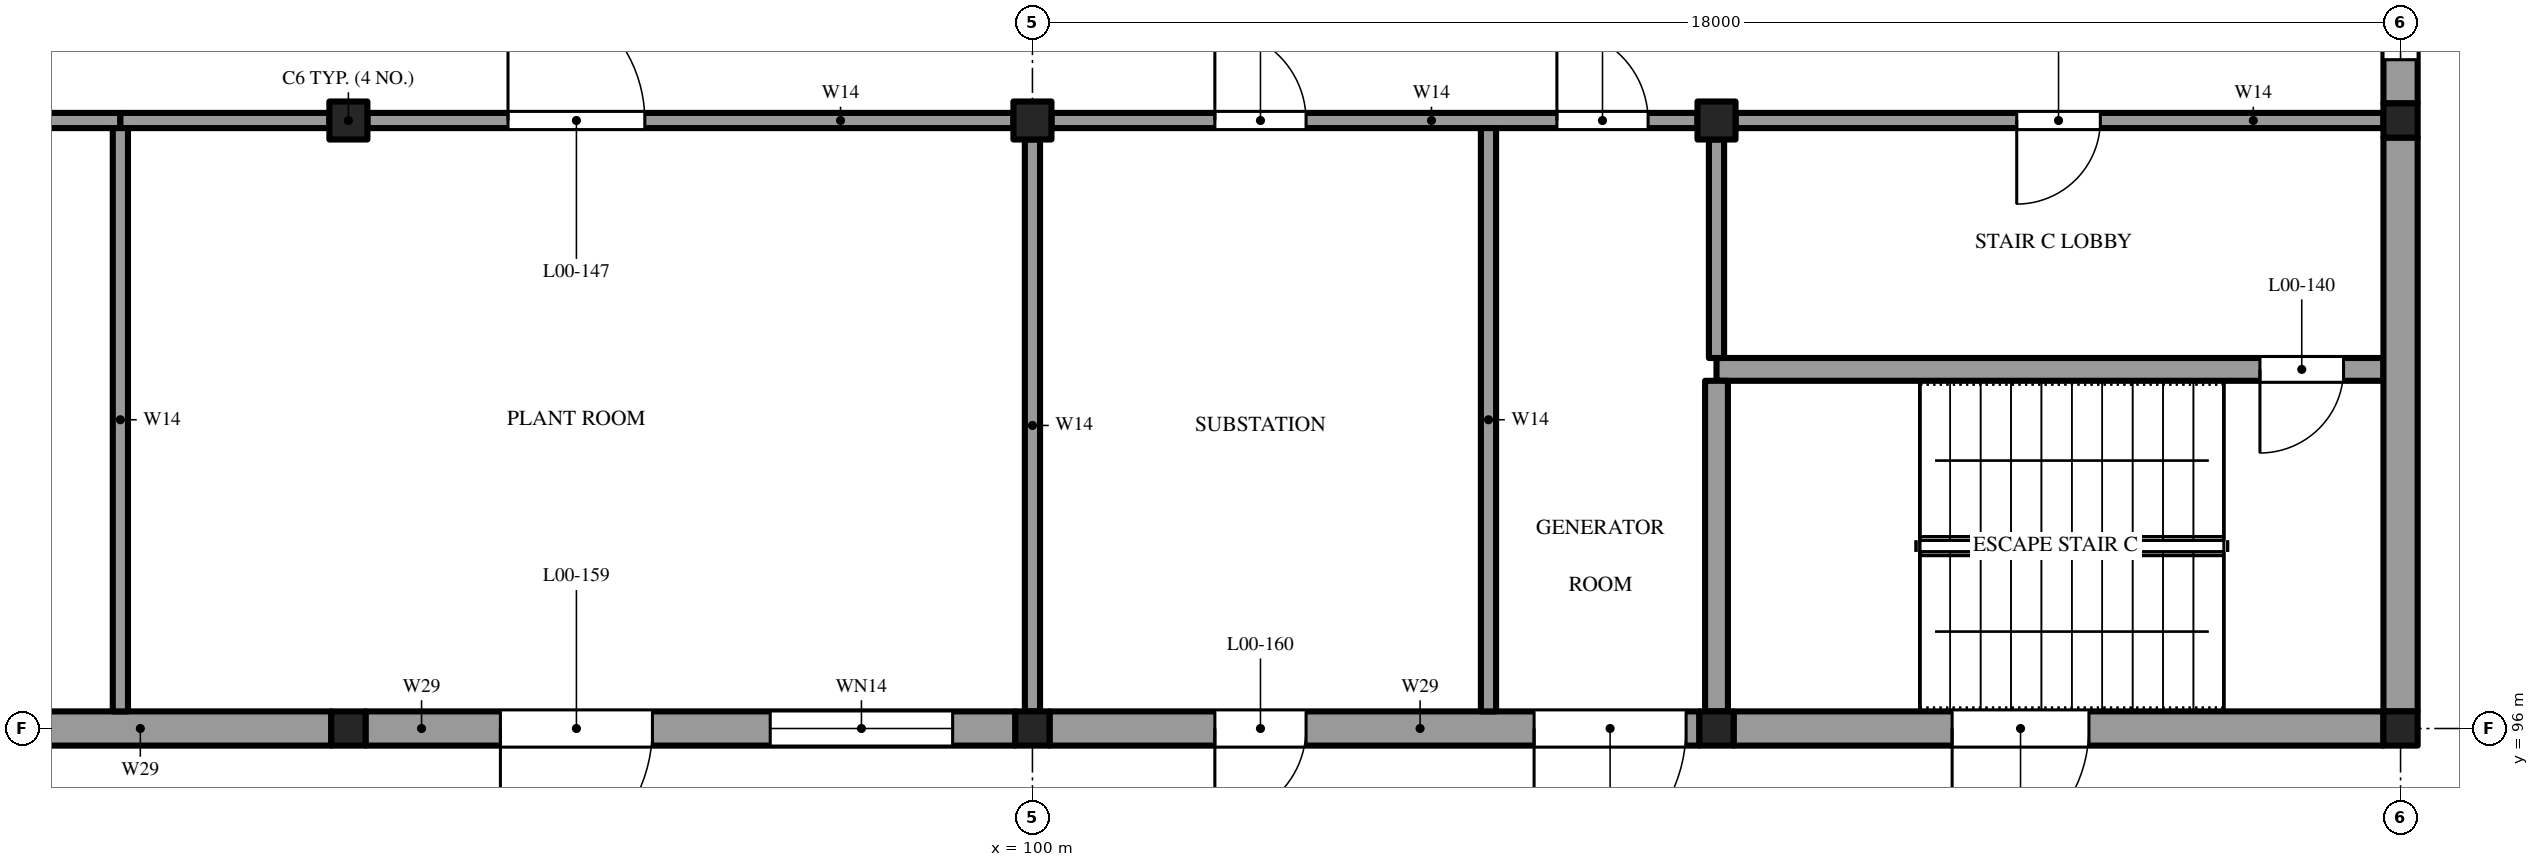
"""IFC4 building model, lengths in metres.
Left out: names, types, materials, properties, quantities, classifications, styles, units other than length and angle.
Written with IfcOpenShell. Run it as: python <this file> out.ifc"""

import sys

from ifc_helpers import new_model, si_unit, direction, frame, frame_2d, origin, origin_2d, place, context, subcontext, project, spatial, rectangle, extrude, element, fill, save


model = new_model("IFC4")
c1 = context("Model", 3, precision=1e-05, world=origin(), true_north=direction((0.0, 1.0)))
c2 = subcontext(c1, "Body", "Model", "MODEL_VIEW")
j1 = project(units=[si_unit("LENGTHUNIT", "METRE"), si_unit("PLANEANGLEUNIT", "RADIAN")], contexts=[c1])
p1 = place(None, origin())
s1 = spatial("IfcSite", under=j1, at=p1, CompositionType="ELEMENT")
p2 = place(p1, origin())
s2 = spatial("IfcBuilding", under=s1, at=p2, CompositionType="ELEMENT")
p3 = place(p2, origin())
s3 = spatial("IfcBuildingStorey", under=s2, at=p3, CompositionType="ELEMENT", Elevation=0.0)
p4 = place(p3, frame((91.0, 96.0, -0.4), z_axis=(0.0, 0.0, 1.0), x_axis=(1.0, 0.0, 0.0)))
e1 = element("IfcColumn", 1, at=p4, inside=s3, PredefinedType="COLUMN", context=c2, shape_type="SweptSolid", body=[
    extrude(rectangle(XDim=0.45, YDim=0.45, at=origin_2d()), origin(), (0.0, 0.0, 1.0), 7.6),
])
p5 = place(p3, frame((91.0, 104.0, -0.4), z_axis=(0.0, 0.0, 1.0), x_axis=(1.0, 0.0, 0.0)))
e2 = element("IfcColumn", 2, at=p5, inside=s3, PredefinedType="COLUMN", context=c2, shape_type="SweptSolid", body=[
    extrude(rectangle(XDim=0.5, YDim=0.5, at=origin_2d()), origin(), (0.0, 0.0, 1.0), 7.6),
])
p6 = place(p3, frame((100.0, 96.0, -0.4), z_axis=(0.0, 0.0, 1.0), x_axis=(1.0, 0.0, 0.0)))
e3 = element("IfcColumn", 3, at=p6, inside=s3, PredefinedType="COLUMN", context=c2, shape_type="SweptSolid", body=[
    extrude(rectangle(XDim=0.45, YDim=0.45, at=origin_2d()), origin(), (0.0, 0.0, 1.0), 7.6),
])
p7 = place(p3, frame((100.0, 104.0, -0.4), z_axis=(0.0, 0.0, 1.0), x_axis=(1.0, 0.0, 0.0)))
e4 = element("IfcColumn", 4, at=p7, inside=s3, PredefinedType="COLUMN", context=c2, shape_type="SweptSolid", body=[
    extrude(rectangle(XDim=0.5, YDim=0.5, at=origin_2d()), origin(), (0.0, 0.0, 1.0), 7.6),
])
p8 = place(p3, frame((109.0, 96.0, -0.4), z_axis=(0.0, 0.0, 1.0), x_axis=(1.0, 0.0, 0.0)))
e5 = element("IfcColumn", 5, at=p8, inside=s3, PredefinedType="COLUMN", context=c2, shape_type="SweptSolid", body=[
    extrude(rectangle(XDim=0.45, YDim=0.45, at=origin_2d()), origin(), (0.0, 0.0, 1.0), 7.6),
])
p9 = place(p3, frame((109.0, 104.0, -0.4), z_axis=(0.0, 0.0, 1.0), x_axis=(1.0, 0.0, 0.0)))
e6 = element("IfcColumn", 6, at=p9, inside=s3, PredefinedType="COLUMN", context=c2, shape_type="SweptSolid", body=[
    extrude(rectangle(XDim=0.5, YDim=0.5, at=origin_2d()), origin(), (0.0, 0.0, 1.0), 7.6),
])
for number, where, z_axis, x_axis in (
    (7, (118.0, 96.0, -0.4), (0.0, 0.0, 1.0), (1.0, 0.0, 0.0)),
    (8, (118.0, 104.0, -0.4), (0.0, 0.0, 1.0), (1.0, 0.0, 0.0)),
):
    element("IfcColumn", number, at=place(p3, frame(where, z_axis=z_axis, x_axis=x_axis)), inside=s3, PredefinedType="COLUMN", context=c2, shape_type="SweptSolid", body=[
        extrude(rectangle(XDim=0.45, YDim=0.45, at=origin_2d()), origin(), (0.0, 0.0, 1.0), 7.6),
    ])
p10 = place(p3, frame((82.225, 96.0, 0.0), z_axis=(0.0, 0.0, 1.0), x_axis=(1.0, 0.0, 0.0)))
e9 = element("IfcWall", 9, at=p10, inside=s3, PredefinedType="SOLIDWALL", context=c2, shape_type="SweptSolid", body=[
    extrude(rectangle(XDim=8.55, YDim=0.45, at=frame_2d((4.275, 0.0))), origin(), (0.0, 0.0, 1.0), 6.9),
])
p11 = place(p10, frame((0.825, 0.0, 4.4)))
e10 = element("IfcOpeningElement", 10, at=p11, cuts=e9, PredefinedType="OPENING", context=c2, shape_type="SweptSolid", body=[
    extrude(rectangle(XDim=2.4, YDim=1.6, at=frame_2d((1.2, 0.8))), frame((0.0, 0.235, 0.0), z_axis=(0.0, -1.0, 0.0), x_axis=(1.0, 0.0, 0.0)), (0.0, 0.0, 1.0), 0.47),
])
p12 = place(p3, frame((91.225, 96.0, 0.0), z_axis=(0.0, 0.0, 1.0), x_axis=(1.0, 0.0, 0.0)))
e11 = element("IfcWall", 11, at=p12, inside=s3, PredefinedType="SOLIDWALL", context=c2, shape_type="SweptSolid", body=[
    extrude(rectangle(XDim=8.55, YDim=0.45, at=frame_2d((4.275, 0.0))), origin(), (0.0, 0.0, 1.0), 6.9),
])
p13 = place(p12, frame((1.775, 0.0, 0.0)))
e12 = element("IfcOpeningElement", 12, at=p13, cuts=e11, PredefinedType="OPENING", context=c2, shape_type="SweptSolid", body=[
    extrude(rectangle(XDim=2.0, YDim=2.4, at=frame_2d((1.0, 1.2))), frame((0.0, 0.235, 0.0), z_axis=(0.0, -1.0, 0.0), x_axis=(1.0, 0.0, 0.0)), (0.0, 0.0, 1.0), 0.47),
])
p14 = place(p12, frame((5.325, 0.0, 4.4)))
e13 = element("IfcOpeningElement", 13, at=p14, cuts=e11, PredefinedType="OPENING", context=c2, shape_type="SweptSolid", body=[
    extrude(rectangle(XDim=2.4, YDim=1.6, at=frame_2d((1.2, 0.8))), frame((0.0, 0.235, 0.0), z_axis=(0.0, -1.0, 0.0), x_axis=(1.0, 0.0, 0.0)), (0.0, 0.0, 1.0), 0.47),
])
p15 = place(p3, frame((100.225, 96.0, 0.0), z_axis=(0.0, 0.0, 1.0), x_axis=(1.0, 0.0, 0.0)))
e14 = element("IfcWall", 14, at=p15, inside=s3, PredefinedType="SOLIDWALL", context=c2, shape_type="SweptSolid", body=[
    extrude(rectangle(XDim=8.55, YDim=0.45, at=frame_2d((4.275, 0.0))), origin(), (0.0, 0.0, 1.0), 6.9),
])
p16 = place(p15, frame((2.175, 0.0, 0.0)))
e15 = element("IfcOpeningElement", 15, at=p16, cuts=e14, PredefinedType="OPENING", context=c2, shape_type="SweptSolid", body=[
    extrude(rectangle(XDim=1.2, YDim=2.1, at=frame_2d((0.6, 1.05))), frame((0.0, 0.235, 0.0), z_axis=(0.0, -1.0, 0.0), x_axis=(1.0, 0.0, 0.0)), (0.0, 0.0, 1.0), 0.47),
])
p17 = place(p15, frame((6.375, 0.0, 0.0)))
e16 = element("IfcOpeningElement", 16, at=p17, cuts=e14, PredefinedType="OPENING", context=c2, shape_type="SweptSolid", body=[
    extrude(rectangle(XDim=2.0, YDim=2.4, at=frame_2d((1.0, 1.2))), frame((0.0, 0.235, 0.0), z_axis=(0.0, -1.0, 0.0), x_axis=(1.0, 0.0, 0.0)), (0.0, 0.0, 1.0), 0.47),
])
p18 = place(p3, frame((109.225, 96.0, 0.0), z_axis=(0.0, 0.0, 1.0), x_axis=(1.0, 0.0, 0.0)))
e17 = element("IfcWall", 17, at=p18, inside=s3, PredefinedType="SOLIDWALL", context=c2, shape_type="SweptSolid", body=[
    extrude(rectangle(XDim=8.55, YDim=0.45, at=frame_2d((4.275, 0.0))), origin(), (0.0, 0.0, 1.0), 6.9),
])
p19 = place(p18, frame((2.875, 0.0, 0.0)))
e18 = element("IfcOpeningElement", 18, at=p19, cuts=e17, PredefinedType="OPENING", context=c2, shape_type="SweptSolid", body=[
    extrude(rectangle(XDim=1.8, YDim=2.1, at=frame_2d((0.9, 1.05))), frame((0.0, 0.235, 0.0), z_axis=(0.0, -1.0, 0.0), x_axis=(1.0, 0.0, 0.0)), (0.0, 0.0, 1.0), 0.47),
])
p20 = place(p3, frame((109.0, 100.725, 0.0), z_axis=(0.0, 0.0, 1.0), x_axis=(1.0, 0.0, 0.0)))
e19 = element("IfcWall", 19, at=p20, inside=s3, PredefinedType="SHEAR", context=c2, shape_type="SweptSolid", body=[
    extrude(rectangle(XDim=8.775, YDim=0.3, at=frame_2d((4.387, 0.0))), origin(), (0.0, 0.0, 1.0), 6.9),
])
p21 = place(p20, frame((7.15, 0.0, 0.0)))
e20 = element("IfcOpeningElement", 20, at=p21, cuts=e19, PredefinedType="OPENING", context=c2, shape_type="SweptSolid", body=[
    extrude(rectangle(XDim=1.1, YDim=2.1, at=frame_2d((0.55, 1.05))), frame((0.0, 0.16, 0.0), z_axis=(0.0, -1.0, 0.0), x_axis=(1.0, 0.0, 0.0)), (0.0, 0.0, 1.0), 0.32),
])
p22 = place(p3, frame((82.25, 104.0, 0.0), z_axis=(0.0, 0.0, 1.0), x_axis=(1.0, 0.0, 0.0)))
e21 = element("IfcWall", 21, at=p22, inside=s3, PredefinedType="SOLIDWALL", context=c2, shape_type="SweptSolid", body=[
    extrude(rectangle(XDim=5.75, YDim=0.2, at=frame_2d((2.875, 0.0))), origin(), (0.0, 0.0, 1.0), 6.9),
])
p23 = place(p3, frame((88.0, 104.0, 0.0), z_axis=(0.0, 0.0, 1.0), x_axis=(1.0, 0.0, 0.0)))
e22 = element("IfcWall", 22, at=p23, inside=s3, PredefinedType="SOLIDWALL", context=c2, shape_type="SweptSolid", body=[
    extrude(rectangle(XDim=2.75, YDim=0.2, at=frame_2d((1.375, 0.0))), origin(), (0.0, 0.0, 1.0), 6.9),
])
p24 = place(p3, frame((91.25, 104.0, 0.0), z_axis=(0.0, 0.0, 1.0), x_axis=(1.0, 0.0, 0.0)))
e23 = element("IfcWall", 23, at=p24, inside=s3, PredefinedType="SOLIDWALL", context=c2, shape_type="SweptSolid", body=[
    extrude(rectangle(XDim=8.5, YDim=0.2, at=frame_2d((4.25, 0.0))), origin(), (0.0, 0.0, 1.0), 6.9),
])
p25 = place(p24, frame((1.85, 0.0, 0.0)))
e24 = element("IfcOpeningElement", 24, at=p25, cuts=e23, PredefinedType="OPENING", context=c2, shape_type="SweptSolid", body=[
    extrude(rectangle(XDim=1.8, YDim=2.1, at=frame_2d((0.9, 1.05))), frame((0.0, 0.11, 0.0), z_axis=(0.0, -1.0, 0.0), x_axis=(1.0, 0.0, 0.0)), (0.0, 0.0, 1.0), 0.22),
])
p26 = place(p3, frame((100.25, 104.0, 0.0), z_axis=(0.0, 0.0, 1.0), x_axis=(1.0, 0.0, 0.0)))
e25 = element("IfcWall", 25, at=p26, inside=s3, PredefinedType="SOLIDWALL", context=c2, shape_type="SweptSolid", body=[
    extrude(rectangle(XDim=8.5, YDim=0.2, at=frame_2d((4.25, 0.0))), origin(), (0.0, 0.0, 1.0), 6.9),
])
p27 = place(p26, frame((2.15, 0.0, 0.0)))
e26 = element("IfcOpeningElement", 26, at=p27, cuts=e25, PredefinedType="OPENING", context=c2, shape_type="SweptSolid", body=[
    extrude(rectangle(XDim=1.2, YDim=2.1, at=frame_2d((0.6, 1.05))), frame((0.0, 0.11, 0.0), z_axis=(0.0, -1.0, 0.0), x_axis=(1.0, 0.0, 0.0)), (0.0, 0.0, 1.0), 0.22),
])
p28 = place(p26, frame((6.65, 0.0, 0.0)))
e27 = element("IfcOpeningElement", 27, at=p28, cuts=e25, PredefinedType="OPENING", context=c2, shape_type="SweptSolid", body=[
    extrude(rectangle(XDim=1.2, YDim=2.1, at=frame_2d((0.6, 1.05))), frame((0.0, 0.11, 0.0), z_axis=(0.0, -1.0, 0.0), x_axis=(1.0, 0.0, 0.0)), (0.0, 0.0, 1.0), 0.22),
])
p29 = place(p3, frame((109.25, 104.0, 0.0), z_axis=(0.0, 0.0, 1.0), x_axis=(1.0, 0.0, 0.0)))
e28 = element("IfcWall", 28, at=p29, inside=s3, PredefinedType="SOLIDWALL", context=c2, shape_type="SweptSolid", body=[
    extrude(rectangle(XDim=8.525, YDim=0.2, at=frame_2d((4.262, 0.0))), origin(), (0.0, 0.0, 1.0), 6.9),
])
p30 = place(p29, frame((3.7, 0.0, 0.0)))
e29 = element("IfcOpeningElement", 29, at=p30, cuts=e28, PredefinedType="OPENING", context=c2, shape_type="SweptSolid", body=[
    extrude(rectangle(XDim=1.1, YDim=2.1, at=frame_2d((0.55, 1.05))), frame((0.0, 0.11, 0.0), z_axis=(0.0, -1.0, 0.0), x_axis=(1.0, 0.0, 0.0)), (0.0, 0.0, 1.0), 0.22),
])
p31 = place(p3, frame((88.0, 96.225, 0.0), z_axis=(0.0, 0.0, 1.0), x_axis=(0.0, 1.0, 0.0)))
e30 = element("IfcWall", 30, at=p31, inside=s3, PredefinedType="SOLIDWALL", context=c2, shape_type="SweptSolid", body=[
    extrude(rectangle(XDim=7.675, YDim=0.2, at=frame_2d((3.837, 0.0))), origin(), (0.0, 0.0, 1.0), 6.9),
])
p32 = place(p3, frame((100.0, 96.225, 0.0), z_axis=(0.0, 0.0, 1.0), x_axis=(0.0, 1.0, 0.0)))
e31 = element("IfcWall", 31, at=p32, inside=s3, PredefinedType="SOLIDWALL", context=c2, shape_type="SweptSolid", body=[
    extrude(rectangle(XDim=7.525, YDim=0.2, at=frame_2d((3.762, 0.0))), origin(), (0.0, 0.0, 1.0), 6.9),
])
p33 = place(p3, frame((106.0, 96.225, 0.0), z_axis=(0.0, 0.0, 1.0), x_axis=(0.0, 1.0, 0.0)))
e32 = element("IfcWall", 32, at=p33, inside=s3, PredefinedType="SOLIDWALL", context=c2, shape_type="SweptSolid", body=[
    extrude(rectangle(XDim=7.675, YDim=0.2, at=frame_2d((3.837, 0.0))), origin(), (0.0, 0.0, 1.0), 6.9),
])
p34 = place(p3, frame((109.0, 96.225, 0.0), z_axis=(0.0, 0.0, 1.0), x_axis=(0.0, 1.0, 0.0)))
e33 = element("IfcWall", 33, at=p34, inside=s3, PredefinedType="SHEAR", context=c2, shape_type="SweptSolid", body=[
    extrude(rectangle(XDim=4.35, YDim=0.3, at=frame_2d((2.175, 0.0))), origin(), (0.0, 0.0, 1.0), 6.9),
])
p35 = place(p3, frame((109.0, 100.875, 0.0), z_axis=(0.0, 0.0, 1.0), x_axis=(0.0, 1.0, 0.0)))
e34 = element("IfcWall", 34, at=p35, inside=s3, PredefinedType="SOLIDWALL", context=c2, shape_type="SweptSolid", body=[
    extrude(rectangle(XDim=2.875, YDim=0.2, at=frame_2d((1.438, 0.0))), origin(), (0.0, 0.0, 1.0), 6.9),
])
p36 = place(p3, frame((118.0, 96.225, 0.0), z_axis=(0.0, 0.0, 1.0), x_axis=(0.0, 1.0, 0.0)))
e35 = element("IfcWall", 35, at=p36, inside=s3, PredefinedType="SOLIDWALL", context=c2, shape_type="SweptSolid", body=[
    extrude(rectangle(XDim=7.55, YDim=0.45, at=frame_2d((3.775, 0.0))), origin(), (0.0, 0.0, 1.0), 6.9),
])
p37 = place(p3, frame((118.0, 104.225, 0.0), z_axis=(0.0, 0.0, 1.0), x_axis=(0.0, 1.0, 0.0)))
e36 = element("IfcWall", 36, at=p37, inside=s3, PredefinedType="SOLIDWALL", context=c2, shape_type="SweptSolid", body=[
    extrude(rectangle(XDim=7.55, YDim=0.45, at=frame_2d((3.775, 0.0))), origin(), (0.0, 0.0, 1.0), 6.9),
])
p38 = place(p37, frame((0.575, 0.0, 4.4)))
e37 = element("IfcOpeningElement", 37, at=p38, cuts=e36, PredefinedType="OPENING", context=c2, shape_type="SweptSolid", body=[
    extrude(rectangle(XDim=2.4, YDim=1.6, at=frame_2d((1.2, 0.8))), frame((0.0, 0.235, 0.0), z_axis=(0.0, -1.0, 0.0), x_axis=(1.0, 0.0, 0.0)), (0.0, 0.0, 1.0), 0.47),
])
p39 = place(p37, frame((4.575, 0.0, 4.4)))
e38 = element("IfcOpeningElement", 38, at=p39, cuts=e36, PredefinedType="OPENING", context=c2, shape_type="SweptSolid", body=[
    extrude(rectangle(XDim=2.4, YDim=1.6, at=frame_2d((1.2, 0.8))), frame((0.0, 0.235, 0.0), z_axis=(0.0, -1.0, 0.0), x_axis=(1.0, 0.0, 0.0)), (0.0, 0.0, 1.0), 0.47),
])
p40 = place(p30, frame((1.1, 0.0, 0.0), z_axis=(0.0, 0.0, 1.0), x_axis=(-1.0, 0.0, 0.0)))
e39 = element("IfcDoor", 39, at=p40, inside=s3, OperationType="SINGLE_SWING_RIGHT", PredefinedType="DOOR", context=c2, shape_type="SweptSolid", body=[
    extrude(rectangle(XDim=1.1, YDim=2.1, at=frame_2d((0.55, 1.05))), frame((0.0, 0.025, 0.0), z_axis=(0.0, -1.0, 0.0), x_axis=(1.0, 0.0, 0.0)), (0.0, 0.0, 1.0), 0.05),
])
fill(e29, e39)
p41 = place(p21, frame((1.1, 0.0, 0.0), z_axis=(0.0, 0.0, 1.0), x_axis=(-1.0, 0.0, 0.0)))
e40 = element("IfcDoor", 40, at=p41, inside=s3, OperationType="SINGLE_SWING_LEFT", PredefinedType="DOOR", context=c2, shape_type="SweptSolid", body=[
    extrude(rectangle(XDim=1.1, YDim=2.1, at=frame_2d((0.55, 1.05))), frame((0.0, 0.025, 0.0), z_axis=(0.0, -1.0, 0.0), x_axis=(1.0, 0.0, 0.0)), (0.0, 0.0, 1.0), 0.05),
])
fill(e20, e40)
p42 = place(p19, frame((1.8, 0.0, 0.0), z_axis=(0.0, 0.0, 1.0), x_axis=(-1.0, 0.0, 0.0)))
e41 = element("IfcDoor", 41, at=p42, inside=s3, OperationType="DOUBLE_DOOR_SINGLE_SWING", PredefinedType="DOOR", context=c2, shape_type="SweptSolid", body=[
    extrude(rectangle(XDim=1.8, YDim=2.1, at=frame_2d((0.9, 1.05))), frame((0.0, 0.025, 0.0), z_axis=(0.0, -1.0, 0.0), x_axis=(1.0, 0.0, 0.0)), (0.0, 0.0, 1.0), 0.05),
])
fill(e18, e41)
p43 = place(p25, origin())
e42 = element("IfcDoor", 42, at=p43, inside=s3, OperationType="DOUBLE_DOOR_SINGLE_SWING", PredefinedType="DOOR", context=c2, shape_type="SweptSolid", body=[
    extrude(rectangle(XDim=1.8, YDim=2.1, at=frame_2d((0.9, 1.05))), frame((0.0, 0.025, 0.0), z_axis=(0.0, -1.0, 0.0), x_axis=(1.0, 0.0, 0.0)), (0.0, 0.0, 1.0), 0.05),
])
fill(e24, e42)
p44 = place(p27, origin())
e43 = element("IfcDoor", 43, at=p44, inside=s3, OperationType="SINGLE_SWING_RIGHT", PredefinedType="DOOR", context=c2, shape_type="SweptSolid", body=[
    extrude(rectangle(XDim=1.2, YDim=2.1, at=frame_2d((0.6, 1.05))), frame((0.0, 0.025, 0.0), z_axis=(0.0, -1.0, 0.0), x_axis=(1.0, 0.0, 0.0)), (0.0, 0.0, 1.0), 0.05),
])
fill(e26, e43)
p45 = place(p28, origin())
e44 = element("IfcDoor", 44, at=p45, inside=s3, OperationType="SINGLE_SWING_LEFT", PredefinedType="DOOR", context=c2, shape_type="SweptSolid", body=[
    extrude(rectangle(XDim=1.2, YDim=2.1, at=frame_2d((0.6, 1.05))), frame((0.0, 0.025, 0.0), z_axis=(0.0, -1.0, 0.0), x_axis=(1.0, 0.0, 0.0)), (0.0, 0.0, 1.0), 0.05),
])
fill(e27, e44)
p46 = place(p13, frame((2.0, 0.0, 0.0), z_axis=(0.0, 0.0, 1.0), x_axis=(-1.0, 0.0, 0.0)))
e45 = element("IfcDoor", 45, at=p46, inside=s3, OperationType="DOUBLE_DOOR_SINGLE_SWING", PredefinedType="DOOR", context=c2, shape_type="SweptSolid", body=[
    extrude(rectangle(XDim=2.0, YDim=2.4, at=frame_2d((1.0, 1.2))), frame((0.0, 0.025, 0.0), z_axis=(0.0, -1.0, 0.0), x_axis=(1.0, 0.0, 0.0)), (0.0, 0.0, 1.0), 0.05),
])
fill(e12, e45)
p47 = place(p16, frame((1.2, 0.0, 0.0), z_axis=(0.0, 0.0, 1.0), x_axis=(-1.0, 0.0, 0.0)))
e46 = element("IfcDoor", 46, at=p47, inside=s3, OperationType="SINGLE_SWING_LEFT", PredefinedType="DOOR", context=c2, shape_type="SweptSolid", body=[
    extrude(rectangle(XDim=1.2, YDim=2.1, at=frame_2d((0.6, 1.05))), frame((0.0, 0.025, 0.0), z_axis=(0.0, -1.0, 0.0), x_axis=(1.0, 0.0, 0.0)), (0.0, 0.0, 1.0), 0.05),
])
fill(e15, e46)
p48 = place(p17, frame((2.0, 0.0, 0.0), z_axis=(0.0, 0.0, 1.0), x_axis=(-1.0, 0.0, 0.0)))
e47 = element("IfcDoor", 47, at=p48, inside=s3, OperationType="DOUBLE_DOOR_SINGLE_SWING", PredefinedType="DOOR", context=c2, shape_type="SweptSolid", body=[
    extrude(rectangle(XDim=2.0, YDim=2.4, at=frame_2d((1.0, 1.2))), frame((0.0, 0.025, 0.0), z_axis=(0.0, -1.0, 0.0), x_axis=(1.0, 0.0, 0.0)), (0.0, 0.0, 1.0), 0.05),
])
fill(e16, e47)
p49 = place(p14, origin())
e48 = element("IfcWindow", 48, at=p49, inside=s3, PartitioningType="SINGLE_PANEL", PredefinedType="WINDOW", context=c2, shape_type="SweptSolid", body=[
    extrude(rectangle(XDim=2.4, YDim=1.6, at=frame_2d((1.2, 0.8))), frame((0.0, 0.215, 0.0), z_axis=(0.0, -1.0, 0.0), x_axis=(1.0, 0.0, 0.0)), (0.0, 0.0, 1.0), 0.06),
])
fill(e13, e48)
p50 = place(p38, origin())
e49 = element("IfcWindow", 49, at=p50, inside=s3, PartitioningType="SINGLE_PANEL", PredefinedType="WINDOW", context=c2, shape_type="SweptSolid", body=[
    extrude(rectangle(XDim=2.4, YDim=1.6, at=frame_2d((1.2, 0.8))), frame((0.0, 0.215, 0.0), z_axis=(0.0, -1.0, 0.0), x_axis=(1.0, 0.0, 0.0)), (0.0, 0.0, 1.0), 0.06),
])
fill(e37, e49)
save(model, sys.argv[1])
